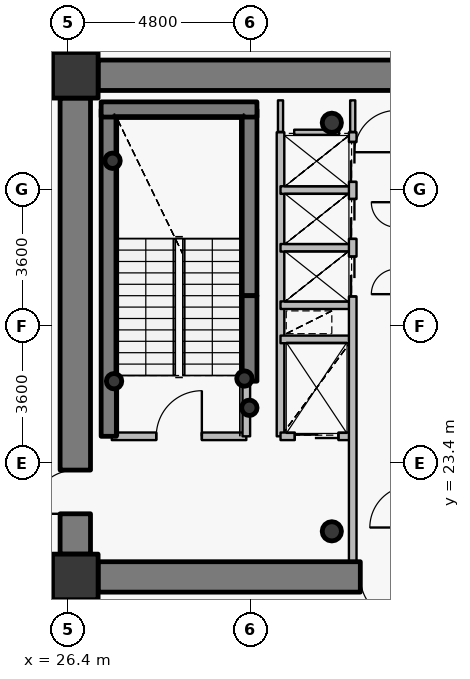
"""IFC4 building model, lengths in metres.
Left out: names, types, materials, properties, quantities, classifications, styles, units other than length and angle.
Written with IfcOpenShell. Run it as: python <this file> out.ifc"""

import sys

from ifc_helpers import new_model, si_unit, direction, frame, frame_2d, origin, origin_2d, place, context, subcontext, project, spatial, rectangle, hollow_circle, extrude, source, transform, mapped, element, fill, save


model = new_model("IFC4")
c1 = context("Model", 3, precision=1e-05, world=origin(), true_north=direction((0.0, 1.0)))
c2 = subcontext(c1, "Body", "Model", "MODEL_VIEW")
j1 = project(units=[si_unit("LENGTHUNIT", "METRE"), si_unit("PLANEANGLEUNIT", "RADIAN")], contexts=[c1])
p1 = place(None, origin())
s1 = spatial("IfcSite", under=j1, at=p1, CompositionType="ELEMENT")
p2 = place(p1, origin())
s2 = spatial("IfcBuilding", under=s1, at=p2, CompositionType="ELEMENT")
p3 = place(p2, frame((0.0, 0.0, 163.65)))
s3 = spatial("IfcBuildingStorey", under=s2, at=p3, CompositionType="ELEMENT", Elevation=163.65)
for number, where, z_axis, x_axis in (
    (1, (26.6, 20.4, 0.0), (0.0, 0.0, 1.0), (1.0, 0.0, 0.0)),
    (2, (26.6, 33.6, 0.0), (0.0, 0.0, 1.0), (1.0, 0.0, 0.0)),
):
    element("IfcColumn", number, at=place(p3, frame(where, z_axis=z_axis, x_axis=x_axis)), inside=s3, PredefinedType="COLUMN", context=c2, shape_type="SweptSolid", body=[
        extrude(rectangle(XDim=1.2, YDim=1.2, at=origin_2d()), origin(), (0.0, 0.0, 1.0), 3.75),
    ])
for number, where, z_axis, x_axis in (
    (3, (33.35, 21.6, 0.0), (0.0, 0.0, 1.0), (1.0, 0.0, 0.0)),
    (4, (33.35, 32.35, 0.0), (0.0, 0.0, 1.0), (1.0, 0.0, 0.0)),
):
    element("IfcColumn", number, at=place(p3, frame(where, z_axis=z_axis, x_axis=x_axis)), inside=s3, PredefinedType="COLUMN", context=c2, shape_type="SweptSolid", body=[
        extrude(hollow_circle(Radius=0.254, WallThickness=0.02, at=origin_2d()), origin(), (0.0, 0.0, 1.0), 3.75),
    ])
p4 = place(p3, frame((27.48, 24.1, 0.0), z_axis=(0.0, 0.0, 1.0), x_axis=(0.0, 1.0, 0.0)))
e5 = element("IfcWall", 5, at=p4, inside=s3, PredefinedType="SHEAR", context=c2, shape_type="SweptSolid", body=[
    extrude(rectangle(XDim=8.6, YDim=0.4, at=frame_2d((4.3, 0.0))), origin(), (0.0, 0.0, 1.0), 3.75),
])
p5 = place(p3, frame((31.18, 27.8, 0.0), z_axis=(0.0, 0.0, 1.0), x_axis=(0.0, 1.0, 0.0)))
e6 = element("IfcWall", 6, at=p5, inside=s3, PredefinedType="SHEAR", context=c2, shape_type="SweptSolid", body=[
    extrude(rectangle(XDim=4.9, YDim=0.4, at=frame_2d((2.45, 0.0))), origin(), (0.0, 0.0, 1.0), 3.75),
])
p6 = place(p3, frame((27.28, 32.7, 0.0), z_axis=(0.0, 0.0, 1.0), x_axis=(1.0, 0.0, 0.0)))
e7 = element("IfcWall", 7, at=p6, inside=s3, PredefinedType="SHEAR", context=c2, shape_type="SweptSolid", body=[
    extrude(rectangle(XDim=4.1, YDim=0.4, at=frame_2d((2.05, 0.0))), origin(), (0.0, 0.0, 1.0), 3.75),
])
for number, where, z_axis, x_axis in (
    (8, (27.58, 31.35, 0.0), (0.0, 0.0, 1.0), (1.0, 0.0, 0.0)),
    (9, (31.05, 25.62, 0.0), (0.0, 0.0, 1.0), (1.0, 0.0, 0.0)),
    (10, (31.18, 24.85, 0.0), (0.0, 0.0, 1.0), (1.0, 0.0, 0.0)),
    (11, (27.62, 25.55, 0.0), (0.0, 0.0, 1.0), (1.0, 0.0, 0.0)),
):
    element("IfcColumn", number, at=place(p3, frame(where, z_axis=z_axis, x_axis=x_axis)), inside=s3, PredefinedType="COLUMN", context=c2, shape_type="SweptSolid", body=[
        extrude(hollow_circle(Radius=0.203, WallThickness=0.016, at=origin_2d()), origin(), (0.0, 0.0, 1.0), 3.75),
    ])
p7 = place(p3, frame((27.2, 33.6, 0.0), z_axis=(0.0, 0.0, 1.0), x_axis=(1.0, 0.0, 0.0)))
e12 = element("IfcWall", 12, at=p7, inside=s3, PredefinedType="SHEAR", context=c2, shape_type="SweptSolid", body=[
    extrude(rectangle(XDim=17.6, YDim=0.8, at=frame_2d((8.8, 0.0))), origin(), (0.0, 0.0, 1.0), 2.95),
])
p8 = place(p7, frame((13.45, 0.0, 0.0)))
e13 = element("IfcOpeningElement", 13, at=p8, cuts=e12, PredefinedType="OPENING", context=c2, shape_type="SweptSolid", body=[
    extrude(rectangle(XDim=1.15, YDim=2.15, at=origin_2d()), frame((0.575, 0.41, 1.075), z_axis=(0.0, -1.0, 0.0), x_axis=(1.0, 0.0, 0.0)), (0.0, 0.0, 1.0), 0.82),
])
p9 = place(p3, frame((44.8, 20.4, 0.0), z_axis=(0.0, 0.0, 1.0), x_axis=(-1.0, 0.0, 0.0)))
e14 = element("IfcWall", 14, at=p9, inside=s3, PredefinedType="SHEAR", context=c2, shape_type="SweptSolid", body=[
    extrude(rectangle(XDim=17.6, YDim=0.8, at=frame_2d((8.8, 0.0))), origin(), (0.0, 0.0, 1.0), 2.95),
])
p10 = place(p9, frame((9.55, 0.0, 0.0)))
e15 = element("IfcOpeningElement", 15, at=p10, cuts=e14, PredefinedType="OPENING", context=c2, shape_type="SweptSolid", body=[
    extrude(rectangle(XDim=1.15, YDim=2.15, at=origin_2d()), frame((0.575, 0.41, 1.075), z_axis=(0.0, -1.0, 0.0), x_axis=(1.0, 0.0, 0.0)), (0.0, 0.0, 1.0), 0.82),
])
p11 = place(p3, frame((26.6, 21.0, 0.0), z_axis=(0.0, 0.0, 1.0), x_axis=(0.0, 1.0, 0.0)))
e16 = element("IfcWall", 16, at=p11, inside=s3, PredefinedType="SHEAR", context=c2, shape_type="SweptSolid", body=[
    extrude(rectangle(XDim=12.0, YDim=0.8, at=frame_2d((6.0, 0.0))), origin(), (0.0, 0.0, 1.0), 2.95),
])
p12 = place(p11, frame((1.061, 0.0, 0.0)))
e17 = element("IfcOpeningElement", 17, at=p12, cuts=e16, PredefinedType="OPENING", context=c2, shape_type="SweptSolid", body=[
    extrude(rectangle(XDim=1.15, YDim=2.15, at=origin_2d()), frame((0.575, 0.41, 1.075), z_axis=(0.0, -1.0, 0.0), x_axis=(1.0, 0.0, 0.0)), (0.0, 0.0, 1.0), 0.82),
])
p13 = place(p3, frame((31.18, 25.55, 0.0), z_axis=(0.0, 0.0, 1.0), x_axis=(0.0, 1.0, 0.0)))
e18 = element("IfcWall", 18, at=p13, inside=s3, PredefinedType="SHEAR", context=c2, shape_type="SweptSolid", body=[
    extrude(rectangle(XDim=2.25, YDim=0.4, at=frame_2d((1.125, 0.0))), origin(), (0.0, 0.0, 1.0), 3.1),
])
p14 = place(p3, frame((27.56, 24.1, 0.0), z_axis=(0.0, 0.0, 1.0), x_axis=(1.0, 0.0, 0.0)))
e19 = element("IfcWall", 19, at=p14, inside=s3, PredefinedType="PARTITIONING", context=c2, shape_type="SweptSolid", body=[
    extrude(rectangle(XDim=3.54, YDim=0.2, at=frame_2d((1.77, 0.0))), origin(), (0.0, 0.0, 1.0), 3.5),
])
p15 = place(p14, frame((1.17, 0.0, 0.0)))
e20 = element("IfcOpeningElement", 20, at=p15, cuts=e19, PredefinedType="OPENING", context=c2, shape_type="SweptSolid", body=[
    extrude(rectangle(XDim=1.2, YDim=2.15, at=origin_2d()), frame((0.6, 0.11, 1.075), z_axis=(0.0, -1.0, 0.0), x_axis=(1.0, 0.0, 0.0)), (0.0, 0.0, 1.0), 0.22),
])
p16 = place(p3, frame((31.1, 24.1, 0.0), z_axis=(0.0, 0.0, 1.0), x_axis=(0.0, 1.0, 0.0)))
e21 = element("IfcWall", 21, at=p16, inside=s3, PredefinedType="PARTITIONING", context=c2, shape_type="SweptSolid", body=[
    extrude(rectangle(XDim=1.44, YDim=0.2, at=frame_2d((0.72, 0.0))), origin(), (0.0, 0.0, 1.0), 3.5),
])
p17 = place(p3, frame((32.0, 24.1, 0.0), z_axis=(0.0, 0.0, 1.0), x_axis=(0.0, 1.0, 0.0)))
e22 = element("IfcWall", 22, at=p17, inside=s3, PredefinedType="PARTITIONING", context=c2, shape_type="SweptSolid", body=[
    extrude(rectangle(XDim=8.0, YDim=0.2, at=frame_2d((4.0, 0.0))), origin(), (0.0, 0.0, 1.0), 3.5),
])
p18 = place(p3, frame((32.0, 24.1, 0.0), z_axis=(0.0, 0.0, 1.0), x_axis=(1.0, 0.0, 0.0)))
e23 = element("IfcWall", 23, at=p18, inside=s3, PredefinedType="PARTITIONING", context=c2, shape_type="SweptSolid", body=[
    extrude(rectangle(XDim=1.9, YDim=0.2, at=frame_2d((0.95, 0.0))), origin(), (0.0, 0.0, 1.0), 3.085),
])
p19 = place(p18, frame((0.375, 0.0, 0.0)))
e24 = element("IfcOpeningElement", 24, at=p19, cuts=e23, PredefinedType="OPENING", context=c2, shape_type="SweptSolid", body=[
    extrude(rectangle(XDim=1.15, YDim=2.15, at=origin_2d()), frame((0.575, 0.11, 1.075), z_axis=(0.0, -1.0, 0.0), x_axis=(1.0, 0.0, 0.0)), (0.0, 0.0, 1.0), 0.22),
])
for number, where, z_axis, x_axis in (
    (25, (32.0, 26.65, 0.0), (0.0, 0.0, 1.0), (1.0, 0.0, 0.0)),
    (26, (32.0, 27.55, 0.0), (0.0, 0.0, 1.0), (1.0, 0.0, 0.0)),
    (27, (32.0, 29.06, 0.0), (0.0, 0.0, 1.0), (1.0, 0.0, 0.0)),
    (28, (32.0, 30.58, 0.0), (0.0, 0.0, 1.0), (1.0, 0.0, 0.0)),
):
    element("IfcWall", number, at=place(p3, frame(where, z_axis=z_axis, x_axis=x_axis)), inside=s3, PredefinedType="PARTITIONING", context=c2, shape_type="SweptSolid", body=[
        extrude(rectangle(XDim=1.9, YDim=0.2, at=frame_2d((0.95, 0.0))), origin(), (0.0, 0.0, 1.0), 3.085),
    ])
p20 = place(p3, frame((33.9, 20.8, 0.0), z_axis=(0.0, 0.0, 1.0), x_axis=(0.0, 1.0, 0.0)))
e29 = element("IfcWall", 29, at=p20, inside=s3, PredefinedType="PARTITIONING", context=c2, shape_type="SweptSolid", body=[
    extrude(rectangle(XDim=11.3, YDim=0.2, at=frame_2d((5.65, 0.0))), origin(), (0.0, 0.0, 1.0), 3.085),
])
p21 = place(p20, frame((6.98, 0.0, 0.0)))
e30 = element("IfcOpeningElement", 30, at=p21, cuts=e29, PredefinedType="OPENING", context=c2, shape_type="SweptSolid", body=[
    extrude(rectangle(XDim=1.05, YDim=2.15, at=origin_2d()), frame((0.525, 0.11, 1.075), z_axis=(0.0, -1.0, 0.0), x_axis=(1.0, 0.0, 0.0)), (0.0, 0.0, 1.0), 0.22),
])
p22 = place(p20, frame((8.495, 0.0, 0.0)))
e31 = element("IfcOpeningElement", 31, at=p22, cuts=e29, PredefinedType="OPENING", context=c2, shape_type="SweptSolid", body=[
    extrude(rectangle(XDim=1.05, YDim=2.15, at=origin_2d()), frame((0.525, 0.11, 1.075), z_axis=(0.0, -1.0, 0.0), x_axis=(1.0, 0.0, 0.0)), (0.0, 0.0, 1.0), 0.22),
])
p23 = place(p20, frame((9.995, 0.0, 0.0)))
e32 = element("IfcOpeningElement", 32, at=p23, cuts=e29, PredefinedType="OPENING", context=c2, shape_type="SweptSolid", body=[
    extrude(rectangle(XDim=1.05, YDim=2.15, at=origin_2d()), frame((0.525, 0.11, 1.075), z_axis=(0.0, -1.0, 0.0), x_axis=(1.0, 0.0, 0.0)), (0.0, 0.0, 1.0), 0.22),
])
p24 = place(p3, frame((32.36, 32.1, 0.0), z_axis=(0.0, 0.0, 1.0), x_axis=(1.0, 0.0, 0.0)))
e33 = element("IfcWall", 33, at=p24, inside=s3, PredefinedType="PARTITIONING", context=c2, shape_type="SweptSolid", body=[
    extrude(rectangle(XDim=1.18, YDim=0.135, at=frame_2d((0.59, 0.0))), origin(), (0.0, 0.0, 1.0), 3.085),
])
p25 = place(p3, frame((32.0, 32.94, 0.0), z_axis=(0.0, 0.0, 1.0), x_axis=(0.0, -1.0, 0.0)))
e34 = element("IfcWall", 34, at=p25, inside=s3, PredefinedType="PARTITIONING", context=c2, shape_type="SweptSolid", body=[
    extrude(rectangle(XDim=0.83, YDim=0.135, at=frame_2d((0.415, 0.0))), origin(), (0.0, 0.0, 1.0), 3.035),
])
p26 = place(p3, frame((33.9, 32.11, 0.0), z_axis=(0.0, 0.0, 1.0), x_axis=(0.0, 1.0, 0.0)))
e35 = element("IfcWall", 35, at=p26, inside=s3, PredefinedType="PARTITIONING", context=c2, shape_type="SweptSolid", body=[
    extrude(rectangle(XDim=0.83, YDim=0.135, at=frame_2d((0.415, 0.0))), origin(), (0.0, 0.0, 1.0), 3.085),
])
p27 = place(p3, frame((27.19, 34.0, 0.0), z_axis=(0.0, 0.0, 1.0), x_axis=(-1.0, 0.0, 0.0)))
e36 = element("IfcWall", 36, at=p27, inside=s3, PredefinedType="PARTITIONING", context=c2, shape_type="SweptSolid", body=[
    extrude(rectangle(XDim=0.99, YDim=0.135, at=frame_2d((0.495, 0.0))), origin(), (0.0, 0.0, 1.0), 2.935),
])
p28 = place(p3, frame((26.2, 33.692, 0.0), z_axis=(0.0, 0.0, 1.0), x_axis=(0.0, -1.0, 0.0)))
e37 = element("IfcWall", 37, at=p28, inside=s3, PredefinedType="PARTITIONING", context=c2, shape_type="SweptSolid", body=[
    extrude(rectangle(XDim=0.682, YDim=0.135, at=frame_2d((0.341, 0.0))), origin(), (0.0, 0.0, 1.0), 3.5),
])
p29 = place(p3, frame((26.2, 20.99, 0.0), z_axis=(0.0, 0.0, 1.0), x_axis=(0.0, -1.0, 0.0)))
e38 = element("IfcWall", 38, at=p29, inside=s3, PredefinedType="PARTITIONING", context=c2, shape_type="SweptSolid", body=[
    extrude(rectangle(XDim=0.99, YDim=0.135, at=frame_2d((0.495, 0.0))), origin(), (0.0, 0.0, 1.0), 3.185),
])
p30 = place(p3, frame((26.508, 20.0, 0.0), z_axis=(0.0, 0.0, 1.0), x_axis=(1.0, 0.0, 0.0)))
e39 = element("IfcWall", 39, at=p30, inside=s3, PredefinedType="PARTITIONING", context=c2, shape_type="SweptSolid", body=[
    extrude(rectangle(XDim=0.682, YDim=0.135, at=frame_2d((0.341, 0.0))), origin(), (0.0, 0.0, 1.0), 2.935),
])
m1 = source(origin(), c2, "Body", "SweptSolid", [
    extrude(rectangle(XDim=1.15, YDim=2.15, at=origin_2d()), frame((0.575, 0.025, 1.075), z_axis=(0.0, -1.0, 0.0), x_axis=(1.0, 0.0, 0.0)), (0.0, 0.0, 1.0), 0.05),
])
p31 = place(p12, origin())
e40 = element("IfcDoor", 40, at=p31, inside=s3, OperationType="SINGLE_SWING_LEFT", PredefinedType="DOOR", context=c2, shape_type="MappedRepresentation", body=[
    mapped(m1, transform((0.0, 0.0, 0.0), x_axis=(1.0, 0.0, 0.0), y_axis=(0.0, 1.0, 0.0), z_axis=(0.0, 0.0, 1.0), scale=1.0)),
])
fill(e17, e40)
p32 = place(p10, origin())
e41 = element("IfcDoor", 41, at=p32, inside=s3, OperationType="SINGLE_SWING_LEFT", PredefinedType="DOOR", context=c2, shape_type="MappedRepresentation", body=[
    mapped(m1, transform((0.0, 0.0, 0.0), x_axis=(1.0, 0.0, 0.0), y_axis=(0.0, 1.0, 0.0), z_axis=(0.0, 0.0, 1.0), scale=1.0)),
])
fill(e15, e41)
m2 = source(origin(), c2, "Body", "SweptSolid", [
    extrude(rectangle(XDim=1.2, YDim=2.15, at=origin_2d()), frame((0.6, 0.025, 1.075), z_axis=(0.0, -1.0, 0.0), x_axis=(1.0, 0.0, 0.0)), (0.0, 0.0, 1.0), 0.05),
])
p33 = place(p15, origin())
e42 = element("IfcDoor", 42, at=p33, inside=s3, OperationType="SINGLE_SWING_RIGHT", PredefinedType="DOOR", context=c2, shape_type="MappedRepresentation", body=[
    mapped(m2, transform((0.0, 0.0, 0.0), x_axis=(1.0, 0.0, 0.0), y_axis=(0.0, 1.0, 0.0), z_axis=(0.0, 0.0, 1.0), scale=1.0)),
])
fill(e20, e42)
m3 = source(origin(), c2, "Body", "SweptSolid", [
    extrude(rectangle(XDim=1.15, YDim=2.15, at=origin_2d()), frame((0.575, 0.025, 1.075), z_axis=(0.0, -1.0, 0.0), x_axis=(1.0, 0.0, 0.0)), (0.0, 0.0, 1.0), 0.05),
])
p34 = place(p19, origin())
e43 = element("IfcDoor", 43, at=p34, inside=s3, OperationType="DOUBLE_DOOR_SLIDING", PredefinedType="USERDEFINED", context=c2, shape_type="MappedRepresentation", body=[
    mapped(m3, transform((0.0, 0.0, 0.0), x_axis=(1.0, 0.0, 0.0), y_axis=(0.0, 1.0, 0.0), z_axis=(0.0, 0.0, 1.0), scale=1.0)),
])
fill(e24, e43)
m4 = source(origin(), c2, "Body", "SweptSolid", [
    extrude(rectangle(XDim=1.05, YDim=2.15, at=origin_2d()), frame((0.525, 0.025, 1.075), z_axis=(0.0, -1.0, 0.0), x_axis=(1.0, 0.0, 0.0)), (0.0, 0.0, 1.0), 0.05),
])
p35 = place(p21, origin())
e44 = element("IfcDoor", 44, at=p35, inside=s3, OperationType="DOUBLE_DOOR_SLIDING", PredefinedType="USERDEFINED", context=c2, shape_type="MappedRepresentation", body=[
    mapped(m4, transform((0.0, 0.0, 0.0), x_axis=(1.0, 0.0, 0.0), y_axis=(0.0, 1.0, 0.0), z_axis=(0.0, 0.0, 1.0), scale=1.0)),
])
fill(e30, e44)
p36 = place(p22, origin())
e45 = element("IfcDoor", 45, at=p36, inside=s3, OperationType="DOUBLE_DOOR_SLIDING", PredefinedType="USERDEFINED", context=c2, shape_type="MappedRepresentation", body=[
    mapped(m4, transform((0.0, 0.0, 0.0), x_axis=(1.0, 0.0, 0.0), y_axis=(0.0, 1.0, 0.0), z_axis=(0.0, 0.0, 1.0), scale=1.0)),
])
fill(e31, e45)
p37 = place(p23, origin())
e46 = element("IfcDoor", 46, at=p37, inside=s3, OperationType="DOUBLE_DOOR_SLIDING", PredefinedType="USERDEFINED", context=c2, shape_type="MappedRepresentation", body=[
    mapped(m4, transform((0.0, 0.0, 0.0), x_axis=(1.0, 0.0, 0.0), y_axis=(0.0, 1.0, 0.0), z_axis=(0.0, 0.0, 1.0), scale=1.0)),
])
fill(e32, e46)
save(model, sys.argv[1])
